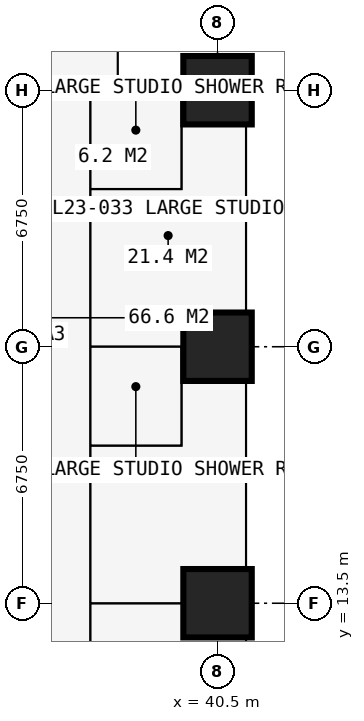
"""IFC4 building model, lengths in metres.
Left out: names, types, materials, properties, quantities, classifications, styles, units other than length and angle.
Written with IfcOpenShell. Run it as: python <this file> out.ifc"""

import sys

from ifc_helpers import new_model, si_unit, direction, frame, frame_2d, origin, origin_2d, place, context, subcontext, project, spatial, rectangle, extrude, element, fill, save


model = new_model("IFC4")
c1 = context("Model", 3, precision=1e-05, world=origin(), true_north=direction((0.0, 1.0)))
c2 = subcontext(c1, "Body", "Model", "MODEL_VIEW")
j1 = project(units=[si_unit("LENGTHUNIT", "METRE"), si_unit("PLANEANGLEUNIT", "RADIAN")], contexts=[c1])
p1 = place(None, origin())
s1 = spatial("IfcSite", under=j1, at=p1, CompositionType="ELEMENT")
p2 = place(p1, origin())
s2 = spatial("IfcBuilding", under=s1, at=p2, CompositionType="ELEMENT")
p3 = place(p2, frame((0.0, 0.0, 87.3)))
s3 = spatial("IfcBuildingStorey", under=s2, at=p3, CompositionType="ELEMENT", Elevation=87.3)
for number, where, z_axis, x_axis in (
    (1, (40.5, 13.5, 0.0), (0.0, 0.0, 1.0), (1.0, 0.0, 0.0)),
    (2, (40.5, 20.25, 0.0), (0.0, 0.0, 1.0), (1.0, 0.0, 0.0)),
    (3, (40.5, 27.0, 0.0), (0.0, 0.0, 1.0), (1.0, 0.0, 0.0)),
):
    element("IfcColumn", number, at=place(p3, frame(where, z_axis=z_axis, x_axis=x_axis)), inside=s3, PredefinedType="COLUMN", context=c2, shape_type="SweptSolid", body=[
        extrude(rectangle(XDim=1.8, YDim=1.8, at=origin_2d()), origin(), (0.0, 0.0, 1.0), 3.6),
    ])
p4 = place(p3, frame((41.25, 20.25, 0.0), z_axis=(0.0, 0.0, 1.0), x_axis=(0.0, -1.0, 0.0)))
e4 = element("IfcWall", 4, at=p4, inside=s3, PredefinedType="SOLIDWALL", context=c2, shape_type="SweptSolid", body=[
    extrude(rectangle(XDim=6.75, YDim=0.15, at=frame_2d((3.375, 0.0))), origin(), (0.0, 0.0, 1.0), 3.375),
])
p5 = place(p4, frame((0.962, 0.0, 0.0)))
e5 = element("IfcOpeningElement", 5, at=p5, cuts=e4, PredefinedType="OPENING", context=c2, shape_type="SweptSolid", body=[
    extrude(rectangle(XDim=1.0, YDim=2.2, at=frame_2d((0.5, 1.1))), frame((0.0, 0.085, 0.0), z_axis=(0.0, -1.0, 0.0), x_axis=(1.0, 0.0, 0.0)), (0.0, 0.0, 1.0), 0.17),
])
p6 = place(p4, frame((2.025, 0.0, 0.9)))
e6 = element("IfcOpeningElement", 6, at=p6, cuts=e4, PredefinedType="OPENING", context=c2, shape_type="SweptSolid", body=[
    extrude(rectangle(XDim=1.2, YDim=1.8, at=frame_2d((0.6, 0.9))), frame((0.0, 0.085, 0.0), z_axis=(0.0, -1.0, 0.0), x_axis=(1.0, 0.0, 0.0)), (0.0, 0.0, 1.0), 0.17),
])
p7 = place(p4, frame((4.788, 0.0, 0.0)))
e7 = element("IfcOpeningElement", 7, at=p7, cuts=e4, PredefinedType="OPENING", context=c2, shape_type="SweptSolid", body=[
    extrude(rectangle(XDim=1.0, YDim=2.2, at=frame_2d((0.5, 1.1))), frame((0.0, 0.085, 0.0), z_axis=(0.0, -1.0, 0.0), x_axis=(1.0, 0.0, 0.0)), (0.0, 0.0, 1.0), 0.17),
])
p8 = place(p4, frame((3.525, 0.0, 0.9)))
e8 = element("IfcOpeningElement", 8, at=p8, cuts=e4, PredefinedType="OPENING", context=c2, shape_type="SweptSolid", body=[
    extrude(rectangle(XDim=1.2, YDim=1.8, at=frame_2d((0.6, 0.9))), frame((0.0, 0.085, 0.0), z_axis=(0.0, -1.0, 0.0), x_axis=(1.0, 0.0, 0.0)), (0.0, 0.0, 1.0), 0.17),
])
p9 = place(p3, frame((41.25, 27.75, 0.0), z_axis=(0.0, 0.0, 1.0), x_axis=(-1.0, 0.0, 0.0)))
e9 = element("IfcWall", 9, at=p9, inside=s3, PredefinedType="SOLIDWALL", context=c2, shape_type="SweptSolid", body=[
    extrude(rectangle(XDim=3.375, YDim=0.3, at=frame_2d((1.688, 0.0))), origin(), (0.0, 0.0, 1.0), 3.375),
])
p10 = place(p9, frame((1.833, 0.0, 0.9)))
e10 = element("IfcOpeningElement", 10, at=p10, cuts=e9, PredefinedType="OPENING", context=c2, shape_type="SweptSolid", body=[
    extrude(rectangle(XDim=1.2, YDim=1.8, at=frame_2d((0.6, 0.9))), frame((0.0, 0.16, 0.0), z_axis=(0.0, -1.0, 0.0), x_axis=(1.0, 0.0, 0.0)), (0.0, 0.0, 1.0), 0.32),
])
p11 = place(p3, frame((37.875, 27.75, 0.0), z_axis=(0.0, 0.0, 1.0), x_axis=(0.0, 1.0, 0.0)))
e11 = element("IfcWall", 11, at=p11, inside=s3, PredefinedType="SOLIDWALL", context=c2, shape_type="SweptSolid", body=[
    extrude(rectangle(XDim=3.375, YDim=0.3, at=frame_2d((1.688, 0.0))), origin(), (0.0, 0.0, 1.0), 3.375),
])
p12 = place(p11, frame((0.788, 0.0, 0.6)))
e12 = element("IfcOpeningElement", 12, at=p12, cuts=e11, PredefinedType="OPENING", context=c2, shape_type="SweptSolid", body=[
    extrude(rectangle(XDim=1.8, YDim=2.1, at=frame_2d((0.9, 1.05))), frame((0.0, 0.16, 0.0), z_axis=(0.0, -1.0, 0.0), x_axis=(1.0, 0.0, 0.0)), (0.0, 0.0, 1.0), 0.32),
])
p13 = place(p3, frame((41.35, 16.875, 0.0), z_axis=(0.0, 0.0, 1.0), x_axis=(1.0, 0.0, 0.0)))
e13 = element("IfcWall", 13, at=p13, inside=s3, PredefinedType="USERDEFINED", context=c2, shape_type="SweptSolid", body=[
    extrude(rectangle(XDim=2.2, YDim=1.0, at=frame_2d((1.1, 0.0))), origin(), (0.0, 0.0, 1.0), 0.9),
])
p14 = place(p3, frame((37.15, 6.75, 0.0), z_axis=(0.0, 0.0, 1.0), x_axis=(0.0, 1.0, 0.0)))
e14 = element("IfcWall", 14, at=p14, inside=s3, PredefinedType="PARTITIONING", context=c2, shape_type="SweptSolid", body=[
    extrude(rectangle(XDim=20.25, YDim=0.15, at=frame_2d((10.125, 0.0))), origin(), (0.0, 0.0, 1.0), 3.375),
])
p15 = place(p14, frame((15.1, 0.0, 0.0)))
e15 = element("IfcOpeningElement", 15, at=p15, cuts=e14, PredefinedType="OPENING", context=c2, shape_type="SweptSolid", body=[
    extrude(rectangle(XDim=0.95, YDim=2.2, at=frame_2d((0.475, 1.1))), frame((0.0, 0.085, 0.0), z_axis=(0.0, -1.0, 0.0), x_axis=(1.0, 0.0, 0.0)), (0.0, 0.0, 1.0), 0.17),
])
p16 = place(p14, frame((8.35, 0.0, 0.0)))
e16 = element("IfcOpeningElement", 16, at=p16, cuts=e14, PredefinedType="OPENING", context=c2, shape_type="SweptSolid", body=[
    extrude(rectangle(XDim=0.95, YDim=2.2, at=frame_2d((0.475, 1.1))), frame((0.0, 0.085, 0.0), z_axis=(0.0, -1.0, 0.0), x_axis=(1.0, 0.0, 0.0)), (0.0, 0.0, 1.0), 0.17),
])
p17 = place(p3, frame((37.15, 13.5, 0.0), z_axis=(0.0, 0.0, 1.0), x_axis=(1.0, 0.0, 0.0)))
e17 = element("IfcWall", 17, at=p17, inside=s3, PredefinedType="PARTITIONING", context=c2, shape_type="SweptSolid", body=[
    extrude(rectangle(XDim=4.084, YDim=0.15, at=frame_2d((2.042, 0.0))), origin(), (0.0, 0.0, 1.0), 2.877),
])
p18 = place(p3, frame((37.15, 17.65, 0.0), z_axis=(0.0, 0.0, 1.0), x_axis=(1.0, 0.0, 0.0)))
e18 = element("IfcWall", 18, at=p18, inside=s3, PredefinedType="PARTITIONING", context=c2, shape_type="SweptSolid", body=[
    extrude(rectangle(XDim=2.4, YDim=0.1, at=frame_2d((1.2, 0.0))), origin(), (0.0, 0.0, 1.0), 3.375),
])
p19 = place(p3, frame((37.15, 20.25, 0.0), z_axis=(0.0, 0.0, 1.0), x_axis=(1.0, 0.0, 0.0)))
e19 = element("IfcWall", 19, at=p19, inside=s3, PredefinedType="PARTITIONING", context=c2, shape_type="SweptSolid", body=[
    extrude(rectangle(XDim=4.084, YDim=0.1, at=frame_2d((2.042, 0.0))), origin(), (0.0, 0.0, 1.0), 2.877),
])
p20 = place(p19, frame((0.75, 0.0, 0.0)))
e20 = element("IfcOpeningElement", 20, at=p20, cuts=e19, PredefinedType="OPENING", context=c2, shape_type="SweptSolid", body=[
    extrude(rectangle(XDim=0.9, YDim=2.2, at=frame_2d((0.45, 1.1))), frame((0.0, 0.06, 0.0), z_axis=(0.0, -1.0, 0.0), x_axis=(1.0, 0.0, 0.0)), (0.0, 0.0, 1.0), 0.12),
])
p21 = place(p3, frame((37.15, 24.4, 0.0), z_axis=(0.0, 0.0, 1.0), x_axis=(1.0, 0.0, 0.0)))
e21 = element("IfcWall", 21, at=p21, inside=s3, PredefinedType="PARTITIONING", context=c2, shape_type="SweptSolid", body=[
    extrude(rectangle(XDim=2.4, YDim=0.1, at=frame_2d((1.2, 0.0))), origin(), (0.0, 0.0, 1.0), 3.375),
])
p22 = place(p3, frame((37.15, 27.0, 0.0), z_axis=(0.0, 0.0, 1.0), x_axis=(1.0, 0.0, 0.0)))
e22 = element("IfcWall", 22, at=p22, inside=s3, PredefinedType="PARTITIONING", context=c2, shape_type="SweptSolid", body=[
    extrude(rectangle(XDim=4.084, YDim=0.1, at=frame_2d((2.042, 0.0))), origin(), (0.0, 0.0, 1.0), 2.877),
])
p23 = place(p3, frame((37.875, 27.0, 0.0), z_axis=(0.0, 0.0, 1.0), x_axis=(0.0, 1.0, 0.0)))
e23 = element("IfcWall", 23, at=p23, inside=s3, PredefinedType="PARTITIONING", context=c2, shape_type="SweptSolid", body=[
    extrude(rectangle(XDim=0.734, YDim=0.15, at=frame_2d((0.367, 0.0))), origin(), (0.0, 0.0, 1.0), 3.375),
])
p24 = place(p3, frame((39.55, 17.65, 0.0), z_axis=(0.0, 0.0, 1.0), x_axis=(0.0, 1.0, 0.0)))
e24 = element("IfcWall", 24, at=p24, inside=s3, PredefinedType="PARTITIONING", context=c2, shape_type="SweptSolid", body=[
    extrude(rectangle(XDim=2.6, YDim=0.1, at=frame_2d((1.3, 0.0))), origin(), (0.0, 0.0, 1.0), 3.375),
])
p25 = place(p3, frame((39.55, 24.4, 0.0), z_axis=(0.0, 0.0, 1.0), x_axis=(0.0, 1.0, 0.0)))
e25 = element("IfcWall", 25, at=p25, inside=s3, PredefinedType="PARTITIONING", context=c2, shape_type="SweptSolid", body=[
    extrude(rectangle(XDim=2.6, YDim=0.1, at=frame_2d((1.3, 0.0))), origin(), (0.0, 0.0, 1.0), 3.375),
])
p26 = place(p25, frame((0.8, 0.0, 0.0)))
e26 = element("IfcOpeningElement", 26, at=p26, cuts=e25, PredefinedType="OPENING", context=c2, shape_type="SweptSolid", body=[
    extrude(rectangle(XDim=0.9, YDim=2.2, at=frame_2d((0.45, 1.1))), frame((0.0, 0.06, 0.0), z_axis=(0.0, -1.0, 0.0), x_axis=(1.0, 0.0, 0.0)), (0.0, 0.0, 1.0), 0.12),
])
p27 = place(p5, origin())
e27 = element("IfcDoor", 27, at=p27, inside=s3, OperationType="SINGLE_SWING_LEFT", PredefinedType="DOOR", context=c2, shape_type="SweptSolid", body=[
    extrude(rectangle(XDim=1.0, YDim=2.2, at=frame_2d((0.5, 1.1))), frame((0.0, 0.025, 0.0), z_axis=(0.0, -1.0, 0.0), x_axis=(1.0, 0.0, 0.0)), (0.0, 0.0, 1.0), 0.05),
])
fill(e5, e27)
p28 = place(p6, origin())
e28 = element("IfcWindow", 28, at=p28, inside=s3, PartitioningType="SINGLE_PANEL", PredefinedType="WINDOW", context=c2, shape_type="SweptSolid", body=[
    extrude(rectangle(XDim=1.2, YDim=1.8, at=frame_2d((0.6, 0.9))), frame((0.0, 0.03, 0.0), z_axis=(0.0, -1.0, 0.0), x_axis=(1.0, 0.0, 0.0)), (0.0, 0.0, 1.0), 0.06),
])
fill(e6, e28)
p29 = place(p7, origin())
e29 = element("IfcDoor", 29, at=p29, inside=s3, OperationType="SINGLE_SWING_RIGHT", PredefinedType="DOOR", context=c2, shape_type="SweptSolid", body=[
    extrude(rectangle(XDim=1.0, YDim=2.2, at=frame_2d((0.5, 1.1))), frame((0.0, 0.025, 0.0), z_axis=(0.0, -1.0, 0.0), x_axis=(1.0, 0.0, 0.0)), (0.0, 0.0, 1.0), 0.05),
])
fill(e7, e29)
p30 = place(p8, origin())
e30 = element("IfcWindow", 30, at=p30, inside=s3, PartitioningType="SINGLE_PANEL", PredefinedType="WINDOW", context=c2, shape_type="SweptSolid", body=[
    extrude(rectangle(XDim=1.2, YDim=1.8, at=frame_2d((0.6, 0.9))), frame((0.0, 0.03, 0.0), z_axis=(0.0, -1.0, 0.0), x_axis=(1.0, 0.0, 0.0)), (0.0, 0.0, 1.0), 0.06),
])
fill(e8, e30)
p31 = place(p10, origin())
e31 = element("IfcWindow", 31, at=p31, inside=s3, PartitioningType="SINGLE_PANEL", PredefinedType="WINDOW", context=c2, shape_type="SweptSolid", body=[
    extrude(rectangle(XDim=1.2, YDim=1.8, at=frame_2d((0.6, 0.9))), frame((0.0, 0.03, 0.0), z_axis=(0.0, -1.0, 0.0), x_axis=(1.0, 0.0, 0.0)), (0.0, 0.0, 1.0), 0.06),
])
fill(e10, e31)
p32 = place(p15, origin())
e32 = element("IfcDoor", 32, at=p32, inside=s3, OperationType="SINGLE_SWING_LEFT", PredefinedType="DOOR", context=c2, shape_type="SweptSolid", body=[
    extrude(rectangle(XDim=0.95, YDim=2.2, at=frame_2d((0.475, 1.1))), frame((0.0, 0.025, 0.0), z_axis=(0.0, -1.0, 0.0), x_axis=(1.0, 0.0, 0.0)), (0.0, 0.0, 1.0), 0.05),
])
fill(e15, e32)
p33 = place(p26, origin())
e33 = element("IfcDoor", 33, at=p33, inside=s3, OperationType="SINGLE_SWING_RIGHT", PredefinedType="DOOR", context=c2, shape_type="SweptSolid", body=[
    extrude(rectangle(XDim=0.9, YDim=2.2, at=frame_2d((0.45, 1.1))), frame((0.0, 0.025, 0.0), z_axis=(0.0, -1.0, 0.0), x_axis=(1.0, 0.0, 0.0)), (0.0, 0.0, 1.0), 0.05),
])
fill(e26, e33)
p34 = place(p16, origin())
e34 = element("IfcDoor", 34, at=p34, inside=s3, OperationType="SINGLE_SWING_LEFT", PredefinedType="DOOR", context=c2, shape_type="SweptSolid", body=[
    extrude(rectangle(XDim=0.95, YDim=2.2, at=frame_2d((0.475, 1.1))), frame((0.0, 0.025, 0.0), z_axis=(0.0, -1.0, 0.0), x_axis=(1.0, 0.0, 0.0)), (0.0, 0.0, 1.0), 0.05),
])
fill(e16, e34)
p35 = place(p20, origin())
e35 = element("IfcDoor", 35, at=p35, inside=s3, OperationType="SINGLE_SWING_RIGHT", PredefinedType="DOOR", context=c2, shape_type="SweptSolid", body=[
    extrude(rectangle(XDim=0.9, YDim=2.2, at=frame_2d((0.45, 1.1))), frame((0.0, 0.025, 0.0), z_axis=(0.0, -1.0, 0.0), x_axis=(1.0, 0.0, 0.0)), (0.0, 0.0, 1.0), 0.05),
])
fill(e20, e35)
save(model, sys.argv[1])
